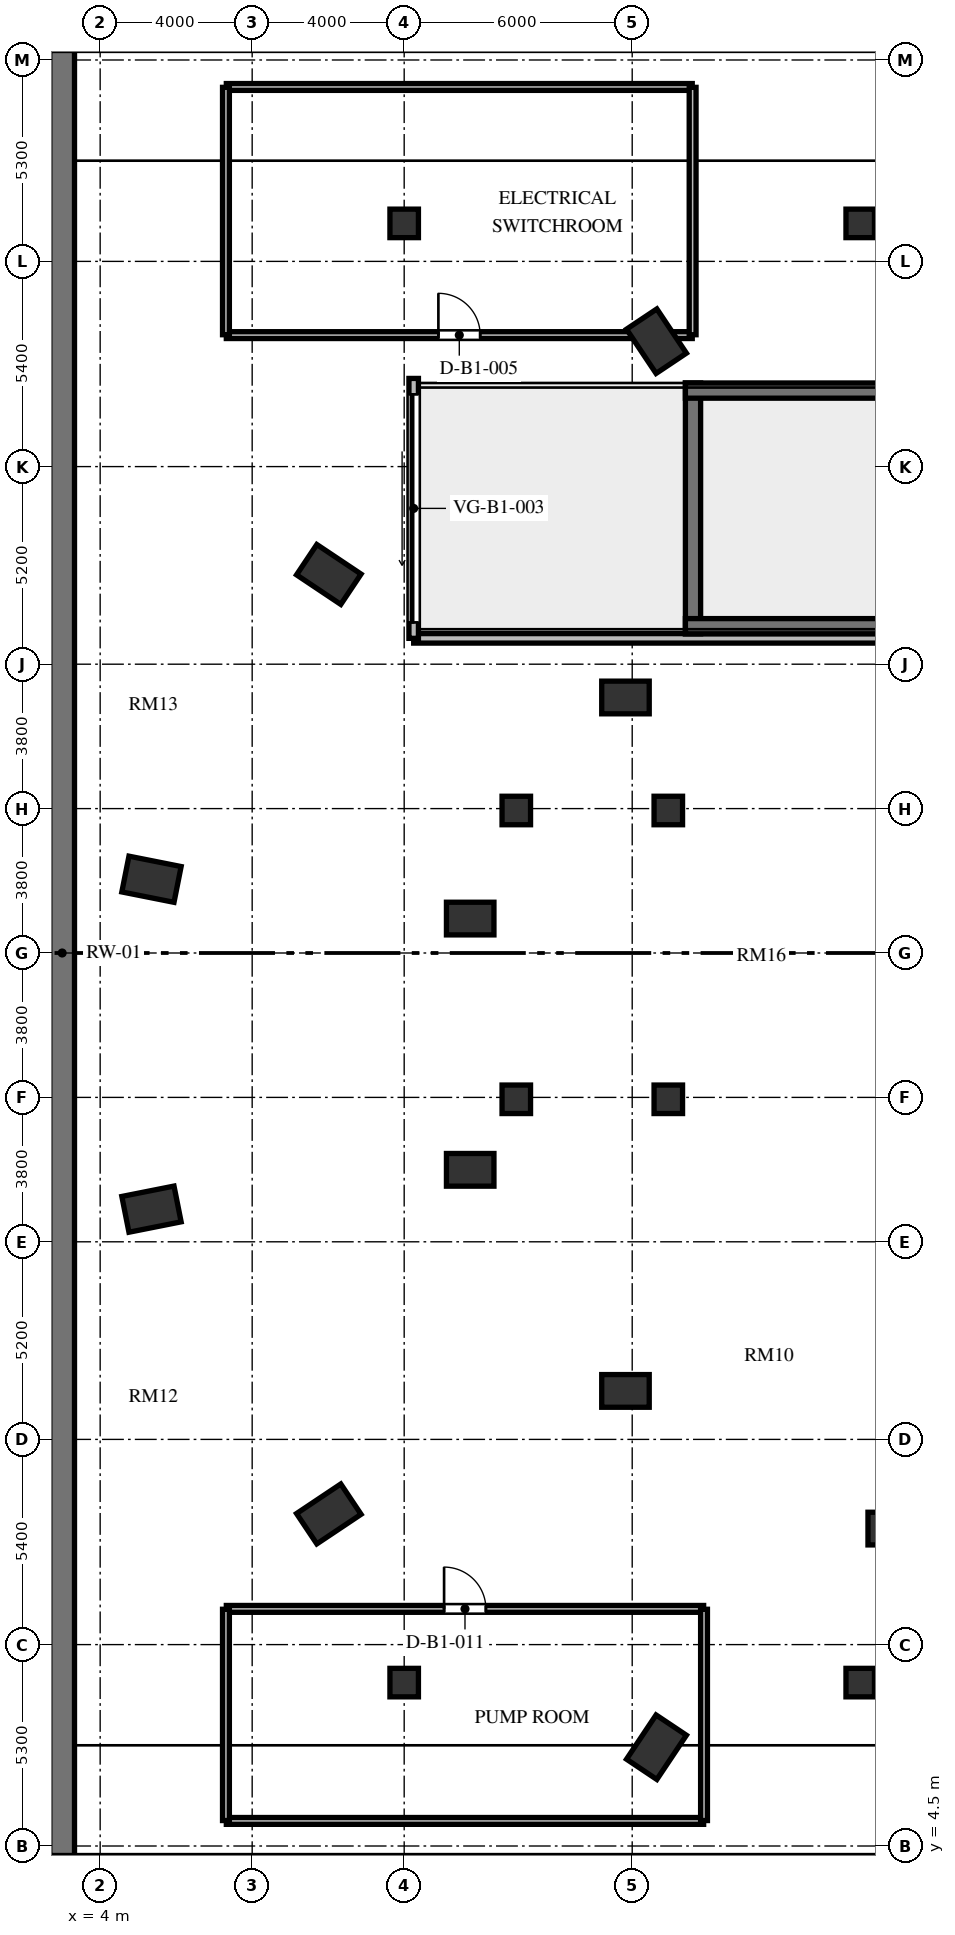
"""IFC4 building model, lengths in metres.
Left out: names, types, materials, properties, quantities, classifications, styles, units other than length and angle.
Written with IfcOpenShell. Run it as: python <this file> out.ifc"""

import sys

from ifc_helpers import new_model, si_unit, direction, frame, frame_2d, origin, origin_2d, place, context, subcontext, project, spatial, rectangle, extrude, element, fill, save


model = new_model("IFC4")
c1 = context("Model", 3, precision=1e-05, world=origin(), true_north=direction((0.0, 1.0)))
c2 = subcontext(c1, "Body", "Model", "MODEL_VIEW")
j1 = project(units=[si_unit("LENGTHUNIT", "METRE"), si_unit("PLANEANGLEUNIT", "RADIAN")], contexts=[c1])
p1 = place(None, origin())
s1 = spatial("IfcSite", under=j1, at=p1, CompositionType="ELEMENT")
p2 = place(p1, origin())
s2 = spatial("IfcBuilding", under=s1, at=p2, CompositionType="ELEMENT")
p3 = place(p2, frame((0.0, 0.0, -5.4)))
s3 = spatial("IfcBuildingStorey", under=s2, at=p3, CompositionType="ELEMENT", Elevation=-5.4)
for number, where, z_axis, x_axis in (
    (1, (18.638, 44.1, 0.0), (0.0, 0.0, 1.0), (-0.556, 0.831, 0.0)),
    (2, (10.017, 37.961, 0.0), (0.0, 0.0, 1.0), (-0.831, 0.556, 0.0)),
    (3, (5.351, 29.941, 0.0), (0.0, 0.0, 1.0), (-0.981, 0.195, 0.0)),
    (4, (5.351, 21.259, 0.0), (0.0, 0.0, 1.0), (-0.981, -0.195, 0.0)),
    (5, (10.017, 13.239, 0.0), (0.0, 0.0, 1.0), (-0.831, -0.556, 0.0)),
    (6, (18.638, 7.1, 0.0), (0.0, 0.0, 1.0), (-0.556, -0.831, 0.0)),
):
    element("IfcColumn", number, at=place(p3, frame(where, z_axis=z_axis, x_axis=x_axis)), inside=s3, PredefinedType="COLUMN", context=c2, shape_type="SweptSolid", body=[
        extrude(rectangle(XDim=1.4, YDim=0.96, at=origin_2d()), origin(), (0.0, 0.0, 1.0), 5.4),
    ])
for number, where, z_axis, x_axis in (
    (7, (17.823, 34.724, 0.0), (0.0, 0.0, 1.0), (1.0, 0.0, 0.0)),
    (8, (13.737, 28.906, 0.0), (0.0, 0.0, 1.0), (1.0, 0.0, 0.0)),
    (9, (13.737, 22.294, 0.0), (0.0, 0.0, 1.0), (1.0, 0.0, 0.0)),
    (10, (17.823, 16.476, 0.0), (0.0, 0.0, 1.0), (1.0, 0.0, 0.0)),
    (11, (24.829, 12.853, 0.0), (0.0, 0.0, 1.0), (1.0, 0.0, 0.0)),
):
    element("IfcColumn", number, at=place(p3, frame(where, z_axis=z_axis, x_axis=x_axis)), inside=s3, PredefinedType="COLUMN", context=c2, shape_type="SweptSolid", body=[
        extrude(rectangle(XDim=1.25, YDim=0.86, at=origin_2d()), origin(), (0.0, 0.0, 1.0), 5.4),
    ])
for number, where, z_axis, x_axis in (
    (12, (12.0, 8.8, 0.0), (0.0, 0.0, 1.0), (1.0, 0.0, 0.0)),
    (13, (24.0, 8.8, 0.0), (0.0, 0.0, 1.0), (1.0, 0.0, 0.0)),
    (14, (12.0, 47.2, 0.0), (0.0, 0.0, 1.0), (1.0, 0.0, 0.0)),
    (15, (24.0, 47.2, 0.0), (0.0, 0.0, 1.0), (1.0, 0.0, 0.0)),
    (16, (14.95, 24.15, 0.0), (0.0, 0.0, 1.0), (1.0, 0.0, 0.0)),
    (17, (18.95, 24.15, 0.0), (0.0, 0.0, 1.0), (1.0, 0.0, 0.0)),
    (18, (18.95, 31.75, 0.0), (0.0, 0.0, 1.0), (1.0, 0.0, 0.0)),
    (19, (14.95, 31.75, 0.0), (0.0, 0.0, 1.0), (1.0, 0.0, 0.0)),
):
    element("IfcColumn", number, at=place(p3, frame(where, z_axis=z_axis, x_axis=x_axis)), inside=s3, PredefinedType="COLUMN", context=c2, shape_type="SweptSolid", body=[
        extrude(rectangle(XDim=0.75, YDim=0.75, at=origin_2d()), origin(), (0.0, 0.0, 1.0), 5.4),
    ])
p4 = place(p3, frame((3.0, 4.25, 0.0), z_axis=(0.0, 0.0, 1.0), x_axis=(0.0, 1.0, 0.0)))
e20 = element("IfcWall", 20, at=p4, inside=s3, PredefinedType="SHEAR", context=c2, shape_type="SweptSolid", body=[
    extrude(rectangle(XDim=47.5, YDim=0.65, at=frame_2d((23.75, 0.0))), origin(), (0.0, 0.0, 1.0), 5.4),
])
p5 = place(p3, frame((12.25, 36.28, 0.0), z_axis=(0.0, 0.0, 1.0), x_axis=(1.0, 0.0, 0.0)))
e21 = element("IfcWall", 21, at=p5, inside=s3, PredefinedType="SOLIDWALL", context=c2, shape_type="SweptSolid", body=[
    extrude(rectangle(XDim=46.5, YDim=0.25, at=frame_2d((23.25, 0.0))), origin(), (0.0, 0.0, 1.0), 5.12),
])
p6 = place(p3, frame((12.25, 36.28, 0.0), z_axis=(0.0, 0.0, 1.0), x_axis=(0.0, 1.0, 0.0)))
e22 = element("IfcWall", 22, at=p6, inside=s3, PredefinedType="SOLIDWALL", context=c2, shape_type="SweptSolid", body=[
    extrude(rectangle(XDim=6.84, YDim=0.25, at=frame_2d((3.42, 0.0))), origin(), (0.0, 0.0, 1.0), 5.12),
])
p7 = place(p6, frame((0.42, 0.0, 0.0)))
e23 = element("IfcOpeningElement", 23, at=p7, cuts=e22, PredefinedType="OPENING", context=c2, shape_type="SweptSolid", body=[
    extrude(rectangle(XDim=6.0, YDim=3.2, at=frame_2d((3.0, 1.6))), frame((0.0, 0.135, 0.0), z_axis=(0.0, -1.0, 0.0), x_axis=(1.0, 0.0, 0.0)), (0.0, 0.0, 1.0), 0.27),
])
p8 = place(p3, frame((7.32, 10.74, 0.0), z_axis=(0.0, 0.0, 1.0), x_axis=(1.0, 0.0, 0.0)))
e24 = element("IfcWall", 24, at=p8, inside=s3, PredefinedType="PARTITIONING", context=c2, shape_type="SweptSolid", body=[
    extrude(rectangle(XDim=12.56, YDim=0.18, at=frame_2d((6.28, 0.0))), origin(), (0.0, 0.0, 1.0), 5.12),
])
p9 = place(p8, frame((5.73, 0.0, 0.0)))
e25 = element("IfcOpeningElement", 25, at=p9, cuts=e24, PredefinedType="OPENING", context=c2, shape_type="SweptSolid", body=[
    extrude(rectangle(XDim=1.1, YDim=2.15, at=frame_2d((0.55, 1.075))), frame((0.0, 0.1, 0.0), z_axis=(0.0, -1.0, 0.0), x_axis=(1.0, 0.0, 0.0)), (0.0, 0.0, 1.0), 0.2),
])
p10 = place(p3, frame((7.32, 5.16, 0.0), z_axis=(0.0, 0.0, 1.0), x_axis=(1.0, 0.0, 0.0)))
e26 = element("IfcWall", 26, at=p10, inside=s3, PredefinedType="PARTITIONING", context=c2, shape_type="SweptSolid", body=[
    extrude(rectangle(XDim=12.56, YDim=0.18, at=frame_2d((6.28, 0.0))), origin(), (0.0, 0.0, 1.0), 5.12),
])
for number, where, z_axis, x_axis in (
    (27, (19.89, 5.17, 0.0), (0.0, 0.0, 1.0), (0.0, 1.0, 0.0)),
    (28, (7.31, 5.17, 0.0), (0.0, 0.0, 1.0), (0.0, 1.0, 0.0)),
):
    element("IfcWall", number, at=place(p3, frame(where, z_axis=z_axis, x_axis=x_axis)), inside=s3, PredefinedType="PARTITIONING", context=c2, shape_type="SweptSolid", body=[
        extrude(rectangle(XDim=5.56, YDim=0.18, at=frame_2d((2.78, 0.0))), origin(), (0.0, 0.0, 1.0), 5.12),
    ])
p11 = place(p3, frame((7.32, 50.79, 0.0), z_axis=(0.0, 0.0, 1.0), x_axis=(1.0, 0.0, 0.0)))
e29 = element("IfcWall", 29, at=p11, inside=s3, PredefinedType="PARTITIONING", context=c2, shape_type="SweptSolid", body=[
    extrude(rectangle(XDim=12.26, YDim=0.18, at=frame_2d((6.13, 0.0))), origin(), (0.0, 0.0, 1.0), 5.12),
])
p12 = place(p3, frame((7.32, 44.26, 0.0), z_axis=(0.0, 0.0, 1.0), x_axis=(1.0, 0.0, 0.0)))
e30 = element("IfcWall", 30, at=p12, inside=s3, PredefinedType="PARTITIONING", context=c2, shape_type="SweptSolid", body=[
    extrude(rectangle(XDim=12.26, YDim=0.18, at=frame_2d((6.13, 0.0))), origin(), (0.0, 0.0, 1.0), 5.12),
])
p13 = place(p12, frame((5.58, 0.0, 0.0)))
e31 = element("IfcOpeningElement", 31, at=p13, cuts=e30, PredefinedType="OPENING", context=c2, shape_type="SweptSolid", body=[
    extrude(rectangle(XDim=1.1, YDim=2.15, at=frame_2d((0.55, 1.075))), frame((0.0, 0.1, 0.0), z_axis=(0.0, -1.0, 0.0), x_axis=(1.0, 0.0, 0.0)), (0.0, 0.0, 1.0), 0.2),
])
for number, where, z_axis, x_axis in (
    (32, (19.59, 44.27, 0.0), (0.0, 0.0, 1.0), (0.0, 1.0, 0.0)),
    (33, (7.31, 44.27, 0.0), (0.0, 0.0, 1.0), (0.0, 1.0, 0.0)),
):
    element("IfcWall", number, at=place(p3, frame(where, z_axis=z_axis, x_axis=x_axis)), inside=s3, PredefinedType="PARTITIONING", context=c2, shape_type="SweptSolid", body=[
        extrude(rectangle(XDim=6.51, YDim=0.18, at=frame_2d((3.255, 0.0))), origin(), (0.0, 0.0, 1.0), 5.12),
    ])
p14 = place(p3, frame((19.6, 36.4, 0.0), z_axis=(0.0, 0.0, 1.0), x_axis=(0.0, 1.0, 0.0)))
e34 = element("IfcWall", 34, at=p14, inside=s3, PredefinedType="SHEAR", context=c2, shape_type="SweptSolid", body=[
    extrude(rectangle(XDim=6.6, YDim=0.4, at=frame_2d((3.3, 0.0))), origin(), (0.0, 0.0, 1.0), 0.6),
])
for number, where, z_axis, x_axis in (
    (35, (19.4, 36.6, 0.0), (0.0, 0.0, 1.0), (1.0, 0.0, 0.0)),
    (36, (19.4, 42.8, 0.0), (0.0, 0.0, 1.0), (1.0, 0.0, 0.0)),
):
    element("IfcWall", number, at=place(p3, frame(where, z_axis=z_axis, x_axis=x_axis)), inside=s3, PredefinedType="SHEAR", context=c2, shape_type="SweptSolid", body=[
        extrude(rectangle(XDim=15.0, YDim=0.4, at=frame_2d((7.5, 0.0))), origin(), (0.0, 0.0, 1.0), 0.6),
    ])
p15 = place(p7, origin())
e37 = element("IfcDoor", 37, at=p15, inside=s3, OperationType="FOLDING_TO_LEFT", PredefinedType="GATE", context=c2, shape_type="SweptSolid", body=[
    extrude(rectangle(XDim=6.0, YDim=3.2, at=frame_2d((3.0, 1.6))), frame((0.0, 0.025, 0.0), z_axis=(0.0, -1.0, 0.0), x_axis=(1.0, 0.0, 0.0)), (0.0, 0.0, 1.0), 0.05),
])
fill(e23, e37)
p16 = place(p9, origin())
e38 = element("IfcDoor", 38, at=p16, inside=s3, OperationType="SINGLE_SWING_LEFT", PredefinedType="DOOR", context=c2, shape_type="SweptSolid", body=[
    extrude(rectangle(XDim=1.1, YDim=2.15, at=frame_2d((0.55, 1.075))), frame((0.0, 0.025, 0.0), z_axis=(0.0, -1.0, 0.0), x_axis=(1.0, 0.0, 0.0)), (0.0, 0.0, 1.0), 0.05),
])
fill(e25, e38)
p17 = place(p13, origin())
e39 = element("IfcDoor", 39, at=p17, inside=s3, OperationType="SINGLE_SWING_LEFT", PredefinedType="DOOR", context=c2, shape_type="SweptSolid", body=[
    extrude(rectangle(XDim=1.1, YDim=2.15, at=frame_2d((0.55, 1.075))), frame((0.0, 0.025, 0.0), z_axis=(0.0, -1.0, 0.0), x_axis=(1.0, 0.0, 0.0)), (0.0, 0.0, 1.0), 0.05),
])
fill(e31, e39)
save(model, sys.argv[1])
